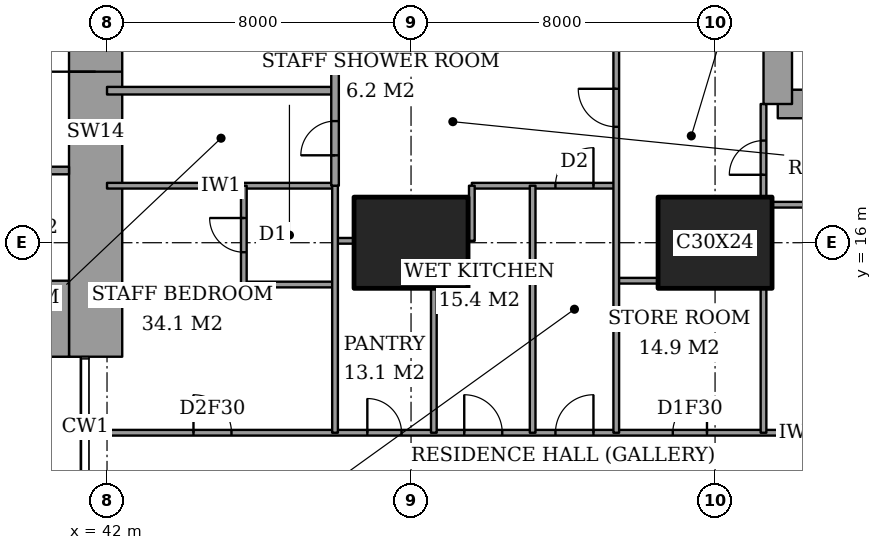
"""IFC4 building model, lengths in metres.
Left out: names, types, materials, properties, quantities, classifications, styles, units other than length and angle.
Written with IfcOpenShell. Run it as: python <this file> out.ifc"""

import sys

from ifc_helpers import new_model, si_unit, direction, frame, frame_2d, origin, origin_2d, place, context, subcontext, project, spatial, rectangle, extrude, element, fill, save


model = new_model("IFC4")
c1 = context("Model", 3, precision=1e-05, world=origin(), true_north=direction((0.0, 1.0)))
c2 = subcontext(c1, "Body", "Model", "MODEL_VIEW")
j1 = project(units=[si_unit("LENGTHUNIT", "METRE"), si_unit("PLANEANGLEUNIT", "RADIAN")], contexts=[c1])
p1 = place(None, origin())
s1 = spatial("IfcSite", under=j1, at=p1, CompositionType="ELEMENT")
p2 = place(p1, origin())
s2 = spatial("IfcBuilding", under=s1, at=p2, CompositionType="ELEMENT")
p3 = place(p2, frame((0.0, 0.0, 157.4)))
s3 = spatial("IfcBuildingStorey", under=s2, at=p3, CompositionType="ELEMENT", Elevation=157.4)
for number, where, z_axis, x_axis in (
    (1, (50.0, 16.0, 0.0), (0.0, 0.0, 1.0), (1.0, 0.0, 0.0)),
    (2, (58.0, 16.0, 0.0), (0.0, 0.0, 1.0), (1.0, 0.0, 0.0)),
):
    element("IfcColumn", number, at=place(p3, frame(where, z_axis=z_axis, x_axis=x_axis)), inside=s3, PredefinedType="COLUMN", context=c2, shape_type="SweptSolid", body=[
        extrude(rectangle(XDim=3.0, YDim=2.4, at=origin_2d()), origin(), (0.0, 0.0, 1.0), 3.6),
    ])
p4 = place(p3, frame((37.85, 14.0, 0.0), z_axis=(0.0, 0.0, 1.0), x_axis=(1.0, 0.0, 0.0)))
e3 = element("IfcWall", 3, at=p4, inside=s3, PredefinedType="SHEAR", context=c2, shape_type="SweptSolid", body=[
    extrude(rectangle(XDim=3.15, YDim=2.0, at=frame_2d((1.575, 0.0))), origin(), (0.0, 0.0, 1.0), 3.6),
])
p5 = place(p3, frame((41.7, 13.0, 0.0), z_axis=(0.0, 0.0, 1.0), x_axis=(0.0, 1.0, 0.0)))
e4 = element("IfcWall", 4, at=p5, inside=s3, PredefinedType="SHEAR", context=c2, shape_type="SweptSolid", body=[
    extrude(rectangle(XDim=11.85, YDim=1.4, at=frame_2d((5.925, 0.0))), origin(), (0.0, 0.0, 1.0), 3.6),
])
p6 = place(p5, frame((7.5, 0.0, 0.0)))
e5 = element("IfcOpeningElement", 5, at=p6, cuts=e4, PredefinedType="OPENING", context=c2, shape_type="SweptSolid", body=[
    extrude(rectangle(XDim=1.8, YDim=2.4, at=frame_2d((0.9, 1.2))), frame((0.0, 0.71, 0.0), z_axis=(0.0, -1.0, 0.0), x_axis=(1.0, 0.0, 0.0)), (0.0, 0.0, 1.0), 1.42),
])
p7 = place(p3, frame((59.65, 19.65, 0.0), z_axis=(0.0, 0.0, 1.0), x_axis=(1.0, 0.0, 0.0)))
e6 = element("IfcWall", 6, at=p7, inside=s3, PredefinedType="SHEAR", context=c2, shape_type="SweptSolid", body=[
    extrude(rectangle(XDim=4.45, YDim=0.75, at=frame_2d((2.225, 0.0))), origin(), (0.0, 0.0, 1.0), 3.6),
])
p8 = place(p3, frame((59.65, 28.35, 0.0), z_axis=(0.0, 0.0, 1.0), x_axis=(0.0, -1.0, 0.0)))
e7 = element("IfcWall", 7, at=p8, inside=s3, PredefinedType="SHEAR", context=c2, shape_type="SweptSolid", body=[
    extrude(rectangle(XDim=8.7, YDim=0.75, at=frame_2d((4.35, 0.0))), origin(), (0.0, 0.0, 1.0), 3.6),
])
p9 = place(p8, frame((0.975, 0.0, 0.0)))
e8 = element("IfcOpeningElement", 8, at=p9, cuts=e7, PredefinedType="OPENING", context=c2, shape_type="SweptSolid", body=[
    extrude(rectangle(XDim=1.0, YDim=2.1, at=frame_2d((0.5, 1.05))), frame((0.0, 0.385, 0.0), z_axis=(0.0, -1.0, 0.0), x_axis=(1.0, 0.0, 0.0)), (0.0, 0.0, 1.0), 0.77),
])
p10 = place(p3, frame((41.439, 11.0, 0.0), z_axis=(0.0, 0.0, 1.0), x_axis=(1.0, 0.0, 0.0)))
e9 = element("IfcWall", 9, at=p10, inside=s3, PredefinedType="PARTITIONING", context=c2, shape_type="SweptSolid", body=[
    extrude(rectangle(XDim=25.011, YDim=0.15, at=frame_2d((12.505, 0.0))), origin(), (0.0, 0.0, 1.0), 3.35),
])
p11 = place(p10, frame((12.361, 0.0, 0.0)))
e10 = element("IfcOpeningElement", 10, at=p11, cuts=e9, PredefinedType="OPENING", context=c2, shape_type="SweptSolid", body=[
    extrude(rectangle(XDim=1.0, YDim=2.1, at=frame_2d((0.5, 1.05))), frame((0.0, 0.085, 0.0), z_axis=(0.0, -1.0, 0.0), x_axis=(1.0, 0.0, 0.0)), (0.0, 0.0, 1.0), 0.17),
])
p12 = place(p10, frame((20.924, 0.0, 0.0)))
e11 = element("IfcOpeningElement", 11, at=p12, cuts=e9, PredefinedType="OPENING", context=c2, shape_type="SweptSolid", body=[
    extrude(rectangle(XDim=1.0, YDim=2.1, at=frame_2d((0.5, 1.05))), frame((0.0, 0.085, 0.0), z_axis=(0.0, -1.0, 0.0), x_axis=(1.0, 0.0, 0.0)), (0.0, 0.0, 1.0), 0.17),
])
p13 = place(p10, frame((15.448, 0.0, 0.0)))
e12 = element("IfcOpeningElement", 12, at=p13, cuts=e9, PredefinedType="OPENING", context=c2, shape_type="SweptSolid", body=[
    extrude(rectangle(XDim=0.9, YDim=2.1, at=frame_2d((0.45, 1.05))), frame((0.0, 0.085, 0.0), z_axis=(0.0, -1.0, 0.0), x_axis=(1.0, 0.0, 0.0)), (0.0, 0.0, 1.0), 0.17),
])
p14 = place(p10, frame((9.961, 0.0, 0.0)))
e13 = element("IfcOpeningElement", 13, at=p14, cuts=e9, PredefinedType="OPENING", context=c2, shape_type="SweptSolid", body=[
    extrude(rectangle(XDim=1.0, YDim=2.1, at=frame_2d((0.5, 1.05))), frame((0.0, 0.085, 0.0), z_axis=(0.0, -1.0, 0.0), x_axis=(1.0, 0.0, 0.0)), (0.0, 0.0, 1.0), 0.17),
])
p15 = place(p10, frame((7.411, 0.0, 0.0)))
e14 = element("IfcOpeningElement", 14, at=p15, cuts=e9, PredefinedType="OPENING", context=c2, shape_type="SweptSolid", body=[
    extrude(rectangle(XDim=0.9, YDim=2.1, at=frame_2d((0.45, 1.05))), frame((0.0, 0.085, 0.0), z_axis=(0.0, -1.0, 0.0), x_axis=(1.0, 0.0, 0.0)), (0.0, 0.0, 1.0), 0.17),
])
p16 = place(p10, frame((2.836, 0.0, 0.0)))
e15 = element("IfcOpeningElement", 15, at=p16, cuts=e9, PredefinedType="OPENING", context=c2, shape_type="SweptSolid", body=[
    extrude(rectangle(XDim=1.0, YDim=2.1, at=frame_2d((0.5, 1.05))), frame((0.0, 0.085, 0.0), z_axis=(0.0, -1.0, 0.0), x_axis=(1.0, 0.0, 0.0)), (0.0, 0.0, 1.0), 0.17),
])
p17 = place(p3, frame((45.6, 14.9, 0.0), z_axis=(0.0, 0.0, 1.0), x_axis=(1.0, 0.0, 0.0)))
e16 = element("IfcWall", 16, at=p17, inside=s3, PredefinedType="PARTITIONING", context=c2, shape_type="SweptSolid", body=[
    extrude(rectangle(XDim=2.4, YDim=0.15, at=frame_2d((1.2, 0.0))), origin(), (0.0, 0.0, 1.0), 3.35),
])
p18 = place(p3, frame((55.4, 15.0, 0.0), z_axis=(0.0, 0.0, 1.0), x_axis=(1.0, 0.0, 0.0)))
e17 = element("IfcWall", 17, at=p18, inside=s3, PredefinedType="PARTITIONING", context=c2, shape_type="SweptSolid", body=[
    extrude(rectangle(XDim=1.1, YDim=0.15, at=frame_2d((0.55, 0.0))), origin(), (0.0, 0.0, 1.0), 3.35),
])
p19 = place(p3, frame((48.0, 16.05, 0.0), z_axis=(0.0, 0.0, 1.0), x_axis=(1.0, 0.0, 0.0)))
e18 = element("IfcWall", 18, at=p19, inside=s3, PredefinedType="PARTITIONING", context=c2, shape_type="SweptSolid", body=[
    extrude(rectangle(XDim=0.5, YDim=0.15, at=frame_2d((0.25, 0.0))), origin(), (0.0, 0.0, 1.0), 2.634),
])
p20 = place(p3, frame((59.5, 17.0, 0.0), z_axis=(0.0, 0.0, 1.0), x_axis=(1.0, 0.0, 0.0)))
e19 = element("IfcWall", 19, at=p20, inside=s3, PredefinedType="PARTITIONING", context=c2, shape_type="SweptSolid", body=[
    extrude(rectangle(XDim=5.15, YDim=0.15, at=frame_2d((2.575, 0.0))), origin(), (0.0, 0.0, 1.0), 3.35),
])
p21 = place(p3, frame((42.0, 17.5, 0.0), z_axis=(0.0, 0.0, 1.0), x_axis=(1.0, 0.0, 0.0)))
e20 = element("IfcWall", 20, at=p21, inside=s3, PredefinedType="PARTITIONING", context=c2, shape_type="SweptSolid", body=[
    extrude(rectangle(XDim=6.0, YDim=0.15, at=frame_2d((3.0, 0.0))), origin(), (0.0, 0.0, 1.0), 3.35),
])
p22 = place(p3, frame((51.6, 17.5, 0.0), z_axis=(0.0, 0.0, 1.0), x_axis=(1.0, 0.0, 0.0)))
e21 = element("IfcWall", 21, at=p22, inside=s3, PredefinedType="PARTITIONING", context=c2, shape_type="SweptSolid", body=[
    extrude(rectangle(XDim=3.8, YDim=0.15, at=frame_2d((1.9, 0.0))), origin(), (0.0, 0.0, 1.0), 3.35),
])
p23 = place(p22, frame((2.2, 0.0, 0.0)))
e22 = element("IfcOpeningElement", 22, at=p23, cuts=e21, PredefinedType="OPENING", context=c2, shape_type="SweptSolid", body=[
    extrude(rectangle(XDim=1.0, YDim=2.1, at=frame_2d((0.5, 1.05))), frame((0.0, 0.085, 0.0), z_axis=(0.0, -1.0, 0.0), x_axis=(1.0, 0.0, 0.0)), (0.0, 0.0, 1.0), 0.17),
])
p24 = place(p3, frame((42.0, 20.0, 0.0), z_axis=(0.0, 0.0, 1.0), x_axis=(1.0, 0.0, 0.0)))
e23 = element("IfcWall", 23, at=p24, inside=s3, PredefinedType="PARTITIONING", context=c2, shape_type="SweptSolid", body=[
    extrude(rectangle(XDim=6.0, YDim=0.2, at=frame_2d((3.0, 0.0))), origin(), (0.0, 0.0, 1.0), 3.35),
])
p25 = place(p3, frame((45.6, 14.9, 0.0), z_axis=(0.0, 0.0, 1.0), x_axis=(0.0, 1.0, 0.0)))
e24 = element("IfcWall", 24, at=p25, inside=s3, PredefinedType="PARTITIONING", context=c2, shape_type="SweptSolid", body=[
    extrude(rectangle(XDim=2.6, YDim=0.15, at=frame_2d((1.3, 0.0))), origin(), (0.0, 0.0, 1.0), 3.35),
])
p26 = place(p25, frame((0.85, 0.0, 0.0)))
e25 = element("IfcOpeningElement", 25, at=p26, cuts=e24, PredefinedType="OPENING", context=c2, shape_type="SweptSolid", body=[
    extrude(rectangle(XDim=0.9, YDim=2.1, at=frame_2d((0.45, 1.05))), frame((0.0, 0.085, 0.0), z_axis=(0.0, -1.0, 0.0), x_axis=(1.0, 0.0, 0.0)), (0.0, 0.0, 1.0), 0.17),
])
p27 = place(p3, frame((48.0, 17.5, 0.0), z_axis=(0.0, 0.0, 1.0), x_axis=(0.0, 1.0, 0.0)))
e26 = element("IfcWall", 26, at=p27, inside=s3, PredefinedType="PARTITIONING", context=c2, shape_type="SweptSolid", body=[
    extrude(rectangle(XDim=6.5, YDim=0.2, at=frame_2d((3.25, 0.0))), origin(), (0.0, 0.0, 1.0), 3.35),
])
p28 = place(p27, frame((3.9, 0.0, 0.0)))
e27 = element("IfcOpeningElement", 27, at=p28, cuts=e26, PredefinedType="OPENING", context=c2, shape_type="SweptSolid", body=[
    extrude(rectangle(XDim=1.2, YDim=2.4, at=frame_2d((0.6, 1.2))), frame((0.0, 0.11, 0.0), z_axis=(0.0, -1.0, 0.0), x_axis=(1.0, 0.0, 0.0)), (0.0, 0.0, 1.0), 0.22),
])
p29 = place(p27, frame((0.8, 0.0, 0.0)))
e28 = element("IfcOpeningElement", 28, at=p29, cuts=e26, PredefinedType="OPENING", context=c2, shape_type="SweptSolid", body=[
    extrude(rectangle(XDim=0.9, YDim=2.1, at=frame_2d((0.45, 1.05))), frame((0.0, 0.11, 0.0), z_axis=(0.0, -1.0, 0.0), x_axis=(1.0, 0.0, 0.0)), (0.0, 0.0, 1.0), 0.22),
])
p30 = place(p3, frame((48.0, 11.0, 0.0), z_axis=(0.0, 0.0, 1.0), x_axis=(0.0, 1.0, 0.0)))
e29 = element("IfcWall", 29, at=p30, inside=s3, PredefinedType="PARTITIONING", context=c2, shape_type="SweptSolid", body=[
    extrude(rectangle(XDim=6.5, YDim=0.15, at=frame_2d((3.25, 0.0))), origin(), (0.0, 0.0, 1.0), 3.35),
])
p31 = place(p3, frame((50.6, 11.0, 0.0), z_axis=(0.0, 0.0, 1.0), x_axis=(0.0, 1.0, 0.0)))
e30 = element("IfcWall", 30, at=p31, inside=s3, PredefinedType="PARTITIONING", context=c2, shape_type="SweptSolid", body=[
    extrude(rectangle(XDim=3.8, YDim=0.15, at=frame_2d((1.9, 0.0))), origin(), (0.0, 0.0, 1.0), 3.35),
])
p32 = place(p3, frame((51.6, 16.05, 0.0), z_axis=(0.0, 0.0, 1.0), x_axis=(0.0, 1.0, 0.0)))
e31 = element("IfcWall", 31, at=p32, inside=s3, PredefinedType="PARTITIONING", context=c2, shape_type="SweptSolid", body=[
    extrude(rectangle(XDim=1.45, YDim=0.15, at=frame_2d((0.725, 0.0))), origin(), (0.0, 0.0, 1.0), 3.35),
])
p33 = place(p3, frame((53.2, 11.0, 0.0), z_axis=(0.0, 0.0, 1.0), x_axis=(0.0, 1.0, 0.0)))
e32 = element("IfcWall", 32, at=p33, inside=s3, PredefinedType="PARTITIONING", context=c2, shape_type="SweptSolid", body=[
    extrude(rectangle(XDim=6.5, YDim=0.15, at=frame_2d((3.25, 0.0))), origin(), (0.0, 0.0, 1.0), 3.35),
])
p34 = place(p3, frame((55.4, 11.0, 0.0), z_axis=(0.0, 0.0, 1.0), x_axis=(0.0, 1.0, 0.0)))
e33 = element("IfcWall", 33, at=p34, inside=s3, PredefinedType="PARTITIONING", context=c2, shape_type="SweptSolid", body=[
    extrude(rectangle(XDim=10.6, YDim=0.15, at=frame_2d((5.3, 0.0))), origin(), (0.0, 0.0, 1.0), 3.35),
])
p35 = place(p34, frame((8.05, 0.0, 0.0)))
e34 = element("IfcOpeningElement", 34, at=p35, cuts=e33, PredefinedType="OPENING", context=c2, shape_type="SweptSolid", body=[
    extrude(rectangle(XDim=1.0, YDim=2.1, at=frame_2d((0.5, 1.05))), frame((0.0, 0.085, 0.0), z_axis=(0.0, -1.0, 0.0), x_axis=(1.0, 0.0, 0.0)), (0.0, 0.0, 1.0), 0.17),
])
p36 = place(p3, frame((59.275, 11.0, 0.0), z_axis=(0.0, 0.0, 1.0), x_axis=(0.0, 1.0, 0.0)))
e35 = element("IfcWall", 35, at=p36, inside=s3, PredefinedType="PARTITIONING", context=c2, shape_type="SweptSolid", body=[
    extrude(rectangle(XDim=3.8, YDim=0.15, at=frame_2d((1.9, 0.0))), origin(), (0.0, 0.0, 1.0), 3.35),
])
p37 = place(p3, frame((59.275, 17.2, 0.0), z_axis=(0.0, 0.0, 1.0), x_axis=(0.0, 1.0, 0.0)))
e36 = element("IfcWall", 36, at=p37, inside=s3, PredefinedType="PARTITIONING", context=c2, shape_type="SweptSolid", body=[
    extrude(rectangle(XDim=2.45, YDim=0.15, at=frame_2d((1.225, 0.0))), origin(), (0.0, 0.0, 1.0), 3.35),
])
p38 = place(p37, frame((0.587, 0.0, 0.0)))
e37 = element("IfcOpeningElement", 37, at=p38, cuts=e36, PredefinedType="OPENING", context=c2, shape_type="SweptSolid", body=[
    extrude(rectangle(XDim=0.9, YDim=2.1, at=frame_2d((0.45, 1.05))), frame((0.0, 0.085, 0.0), z_axis=(0.0, -1.0, 0.0), x_axis=(1.0, 0.0, 0.0)), (0.0, 0.0, 1.0), 0.17),
])
p39 = place(p3, frame((28.3, 17.9, 0.0), z_axis=(0.0, 0.0, 1.0), x_axis=(1.0, 0.0, 0.0)))
e38 = element("IfcWall", 38, at=p39, inside=s3, PredefinedType="PARTITIONING", context=c2, shape_type="SweptSolid", body=[
    extrude(rectangle(XDim=12.7, YDim=0.2, at=frame_2d((6.35, 0.0))), origin(), (0.0, 0.0, 1.0), 3.6),
])
p40 = place(p39, frame((0.95, 0.0, 0.0)))
e39 = element("IfcOpeningElement", 39, at=p40, cuts=e38, PredefinedType="OPENING", context=c2, shape_type="SweptSolid", body=[
    extrude(rectangle(XDim=1.1, YDim=2.1, at=frame_2d((0.55, 1.05))), frame((0.0, 0.11, 0.0), z_axis=(0.0, -1.0, 0.0), x_axis=(1.0, 0.0, 0.0)), (0.0, 0.0, 1.0), 0.22),
])
p41 = place(p39, frame((4.15, 0.0, 0.0)))
e40 = element("IfcOpeningElement", 40, at=p41, cuts=e38, PredefinedType="OPENING", context=c2, shape_type="SweptSolid", body=[
    extrude(rectangle(XDim=1.1, YDim=2.1, at=frame_2d((0.55, 1.05))), frame((0.0, 0.11, 0.0), z_axis=(0.0, -1.0, 0.0), x_axis=(1.0, 0.0, 0.0)), (0.0, 0.0, 1.0), 0.22),
])
p42 = place(p39, frame((7.35, 0.0, 0.0)))
e41 = element("IfcOpeningElement", 41, at=p42, cuts=e38, PredefinedType="OPENING", context=c2, shape_type="SweptSolid", body=[
    extrude(rectangle(XDim=1.1, YDim=2.1, at=frame_2d((0.55, 1.05))), frame((0.0, 0.11, 0.0), z_axis=(0.0, -1.0, 0.0), x_axis=(1.0, 0.0, 0.0)), (0.0, 0.0, 1.0), 0.22),
])
p43 = place(p39, frame((10.6, 0.0, 0.0)))
e42 = element("IfcOpeningElement", 42, at=p43, cuts=e38, PredefinedType="OPENING", context=c2, shape_type="SweptSolid", body=[
    extrude(rectangle(XDim=1.2, YDim=2.1, at=frame_2d((0.6, 1.05))), frame((0.0, 0.11, 0.0), z_axis=(0.0, -1.0, 0.0), x_axis=(1.0, 0.0, 0.0)), (0.0, 0.0, 1.0), 0.22),
])
p44 = place(p11, origin())
e43 = element("IfcDoor", 43, at=p44, inside=s3, OperationType="SINGLE_SWING_LEFT", PredefinedType="DOOR", context=c2, shape_type="SweptSolid", body=[
    extrude(rectangle(XDim=1.0, YDim=2.1, at=frame_2d((0.5, 1.05))), frame((0.0, 0.025, 0.0), z_axis=(0.0, -1.0, 0.0), x_axis=(1.0, 0.0, 0.0)), (0.0, 0.0, 1.0), 0.05),
])
fill(e10, e43)
p45 = place(p38, origin())
e44 = element("IfcDoor", 44, at=p45, inside=s3, OperationType="SINGLE_SWING_RIGHT", PredefinedType="DOOR", context=c2, shape_type="SweptSolid", body=[
    extrude(rectangle(XDim=0.9, YDim=2.1, at=frame_2d((0.45, 1.05))), frame((0.0, 0.025, 0.0), z_axis=(0.0, -1.0, 0.0), x_axis=(1.0, 0.0, 0.0)), (0.0, 0.0, 1.0), 0.05),
])
fill(e37, e44)
p46 = place(p13, origin())
e45 = element("IfcDoor", 45, at=p46, inside=s3, OperationType="SINGLE_SWING_LEFT", PredefinedType="DOOR", context=c2, shape_type="SweptSolid", body=[
    extrude(rectangle(XDim=0.9, YDim=2.1, at=frame_2d((0.45, 1.05))), frame((0.0, 0.025, 0.0), z_axis=(0.0, -1.0, 0.0), x_axis=(1.0, 0.0, 0.0)), (0.0, 0.0, 1.0), 0.05),
])
fill(e12, e45)
p47 = place(p35, origin())
e46 = element("IfcDoor", 46, at=p47, inside=s3, OperationType="SINGLE_SWING_LEFT", PredefinedType="DOOR", context=c2, shape_type="SweptSolid", body=[
    extrude(rectangle(XDim=1.0, YDim=2.1, at=frame_2d((0.5, 1.05))), frame((0.0, 0.025, 0.0), z_axis=(0.0, -1.0, 0.0), x_axis=(1.0, 0.0, 0.0)), (0.0, 0.0, 1.0), 0.05),
])
fill(e34, e46)
p48 = place(p23, origin())
e47 = element("IfcDoor", 47, at=p48, inside=s3, OperationType="SINGLE_SWING_LEFT", PredefinedType="DOOR", context=c2, shape_type="SweptSolid", body=[
    extrude(rectangle(XDim=1.0, YDim=2.1, at=frame_2d((0.5, 1.05))), frame((0.0, 0.025, 0.0), z_axis=(0.0, -1.0, 0.0), x_axis=(1.0, 0.0, 0.0)), (0.0, 0.0, 1.0), 0.05),
])
fill(e22, e47)
p49 = place(p14, origin())
e48 = element("IfcDoor", 48, at=p49, inside=s3, OperationType="SINGLE_SWING_RIGHT", PredefinedType="DOOR", context=c2, shape_type="SweptSolid", body=[
    extrude(rectangle(XDim=1.0, YDim=2.1, at=frame_2d((0.5, 1.05))), frame((0.0, 0.025, 0.0), z_axis=(0.0, -1.0, 0.0), x_axis=(1.0, 0.0, 0.0)), (0.0, 0.0, 1.0), 0.05),
])
fill(e13, e48)
p50 = place(p15, origin())
e49 = element("IfcDoor", 49, at=p50, inside=s3, OperationType="SINGLE_SWING_RIGHT", PredefinedType="DOOR", context=c2, shape_type="SweptSolid", body=[
    extrude(rectangle(XDim=0.9, YDim=2.1, at=frame_2d((0.45, 1.05))), frame((0.0, 0.025, 0.0), z_axis=(0.0, -1.0, 0.0), x_axis=(1.0, 0.0, 0.0)), (0.0, 0.0, 1.0), 0.05),
])
fill(e14, e49)
p51 = place(p26, origin())
e50 = element("IfcDoor", 50, at=p51, inside=s3, OperationType="SINGLE_SWING_LEFT", PredefinedType="DOOR", context=c2, shape_type="SweptSolid", body=[
    extrude(rectangle(XDim=0.9, YDim=2.1, at=frame_2d((0.45, 1.05))), frame((0.0, 0.025, 0.0), z_axis=(0.0, -1.0, 0.0), x_axis=(1.0, 0.0, 0.0)), (0.0, 0.0, 1.0), 0.05),
])
fill(e25, e50)
p52 = place(p16, origin())
e51 = element("IfcDoor", 51, at=p52, inside=s3, OperationType="SINGLE_SWING_RIGHT", PredefinedType="DOOR", context=c2, shape_type="SweptSolid", body=[
    extrude(rectangle(XDim=1.0, YDim=2.1, at=frame_2d((0.5, 1.05))), frame((0.0, 0.025, 0.0), z_axis=(0.0, -1.0, 0.0), x_axis=(1.0, 0.0, 0.0)), (0.0, 0.0, 1.0), 0.05),
])
fill(e15, e51)
p53 = place(p29, origin())
e52 = element("IfcDoor", 52, at=p53, inside=s3, OperationType="SINGLE_SWING_RIGHT", PredefinedType="DOOR", context=c2, shape_type="SweptSolid", body=[
    extrude(rectangle(XDim=0.9, YDim=2.1, at=frame_2d((0.45, 1.05))), frame((0.0, 0.025, 0.0), z_axis=(0.0, -1.0, 0.0), x_axis=(1.0, 0.0, 0.0)), (0.0, 0.0, 1.0), 0.05),
])
fill(e28, e52)
p54 = place(p6, origin())
e53 = element("IfcDoor", 53, at=p54, inside=s3, OperationType="DOUBLE_DOOR_DOUBLE_SWING", PredefinedType="DOOR", context=c2, shape_type="SweptSolid", body=[
    extrude(rectangle(XDim=1.8, YDim=2.4, at=frame_2d((0.9, 1.2))), frame((0.0, 0.025, 0.0), z_axis=(0.0, -1.0, 0.0), x_axis=(1.0, 0.0, 0.0)), (0.0, 0.0, 1.0), 0.05),
])
fill(e5, e53)
save(model, sys.argv[1])
